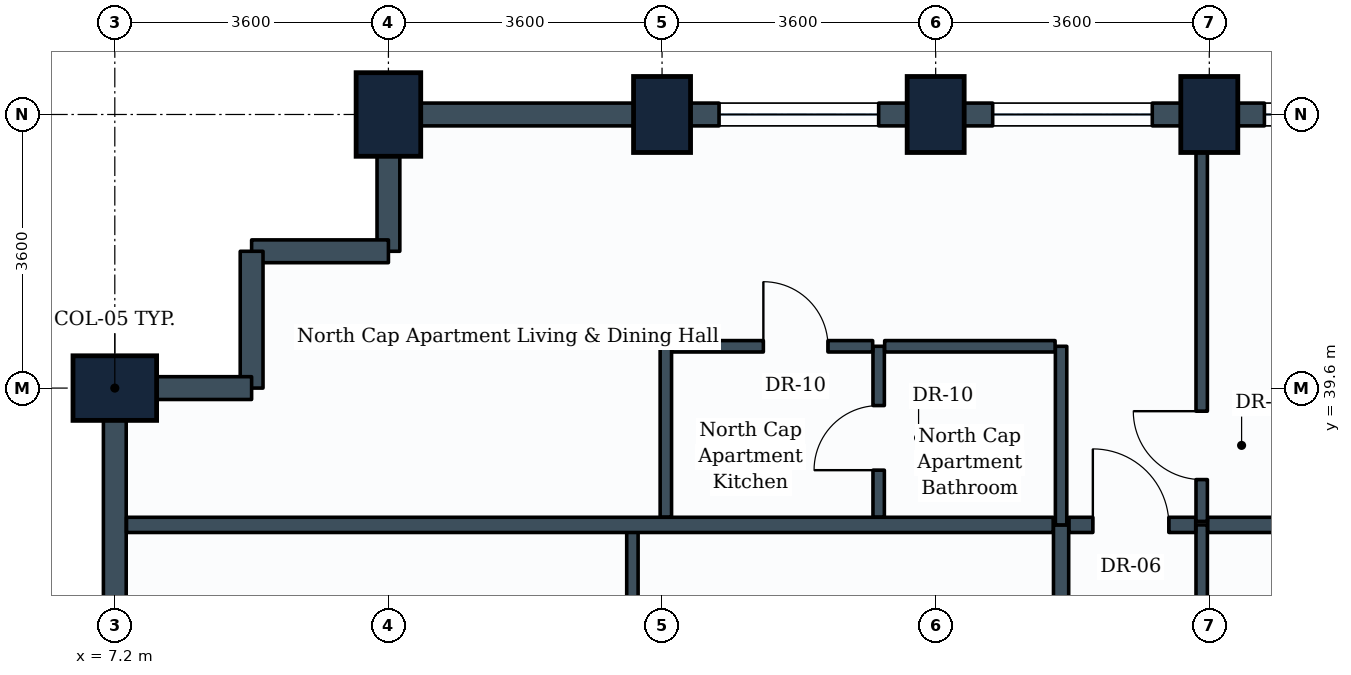
"""IFC4 building model, lengths in metres.
Left out: names, types, materials, properties, quantities, classifications, styles, units other than length and angle.
Written with IfcOpenShell. Run it as: python <this file> out.ifc"""

import sys

from ifc_helpers import new_model, si_unit, direction, frame, frame_2d, origin, origin_2d, place, context, subcontext, project, spatial, rectangle, extrude, element, fill, save


model = new_model("IFC4")
c1 = context("Model", 3, precision=1e-05, world=origin(), true_north=direction((0.0, 1.0)))
c2 = subcontext(c1, "Body", "Model", "MODEL_VIEW")
j1 = project(units=[si_unit("LENGTHUNIT", "METRE"), si_unit("PLANEANGLEUNIT", "RADIAN")], contexts=[c1])
p1 = place(None, origin())
s1 = spatial("IfcSite", under=j1, at=p1, CompositionType="ELEMENT")
p2 = place(p1, origin())
s2 = spatial("IfcBuilding", under=s1, at=p2, CompositionType="ELEMENT")
p3 = place(p2, frame((0.0, 0.0, 146.6)))
s3 = spatial("IfcBuildingStorey", under=s2, at=p3, CompositionType="ELEMENT", Elevation=146.6)
for number, where, z_axis, x_axis in (
    (1, (7.2, 39.6, 0.0), (0.0, 0.0, 1.0), (0.0, 1.0, 0.0)),
    (2, (10.8, 43.2, 0.0), (0.0, 0.0, 1.0), (1.0, 0.0, 0.0)),
):
    element("IfcColumn", number, at=place(p3, frame(where, z_axis=z_axis, x_axis=x_axis)), inside=s3, PredefinedType="COLUMN", context=c2, shape_type="SweptSolid", body=[
        extrude(rectangle(XDim=0.85, YDim=1.1, at=origin_2d()), origin(), (0.0, 0.0, 1.0), 3.8),
    ])
for number, where, z_axis, x_axis in (
    (3, (14.4, 43.2, 0.0), (0.0, 0.0, 1.0), (1.0, 0.0, 0.0)),
    (4, (18.0, 43.2, 0.0), (0.0, 0.0, 1.0), (1.0, 0.0, 0.0)),
    (5, (21.6, 43.2, 0.0), (0.0, 0.0, 1.0), (1.0, 0.0, 0.0)),
):
    element("IfcColumn", number, at=place(p3, frame(where, z_axis=z_axis, x_axis=x_axis)), inside=s3, PredefinedType="COLUMN", context=c2, shape_type="SweptSolid", body=[
        extrude(rectangle(XDim=0.75, YDim=1.0, at=origin_2d()), origin(), (0.0, 0.0, 1.0), 3.8),
    ])
p4 = place(p3, frame((21.6, 43.2, 0.0), z_axis=(0.0, 0.0, 1.0), x_axis=(1.0, 0.0, 0.0)))
e6 = element("IfcWall", 6, at=p4, inside=s3, PredefinedType="STANDARD", context=c2, shape_type="SweptSolid", body=[
    extrude(rectangle(XDim=3.6, YDim=0.3, at=frame_2d((1.8, 0.0))), origin(), (0.0, 0.0, 1.0), 2.93),
])
p5 = place(p4, frame((0.725, 0.0, 0.85)))
e7 = element("IfcOpeningElement", 7, at=p5, cuts=e6, PredefinedType="OPENING", context=c2, shape_type="SweptSolid", body=[
    extrude(rectangle(XDim=2.1, YDim=1.35, at=frame_2d((1.05, 0.675))), frame((0.0, 0.16, 0.0), z_axis=(0.0, -1.0, 0.0), x_axis=(1.0, 0.0, 0.0)), (0.0, 0.0, 1.0), 0.32),
])
p6 = place(p3, frame((18.0, 43.2, 0.0), z_axis=(0.0, 0.0, 1.0), x_axis=(1.0, 0.0, 0.0)))
e8 = element("IfcWall", 8, at=p6, inside=s3, PredefinedType="STANDARD", context=c2, shape_type="SweptSolid", body=[
    extrude(rectangle(XDim=3.6, YDim=0.3, at=frame_2d((1.8, 0.0))), origin(), (0.0, 0.0, 1.0), 2.93),
])
p7 = place(p6, frame((0.75, 0.0, 0.85)))
e9 = element("IfcOpeningElement", 9, at=p7, cuts=e8, PredefinedType="OPENING", context=c2, shape_type="SweptSolid", body=[
    extrude(rectangle(XDim=2.1, YDim=1.35, at=frame_2d((1.05, 0.675))), frame((0.0, 0.16, 0.0), z_axis=(0.0, -1.0, 0.0), x_axis=(1.0, 0.0, 0.0)), (0.0, 0.0, 1.0), 0.32),
])
p8 = place(p3, frame((14.4, 43.2, 0.0), z_axis=(0.0, 0.0, 1.0), x_axis=(1.0, 0.0, 0.0)))
e10 = element("IfcWall", 10, at=p8, inside=s3, PredefinedType="STANDARD", context=c2, shape_type="SweptSolid", body=[
    extrude(rectangle(XDim=3.6, YDim=0.3, at=frame_2d((1.8, 0.0))), origin(), (0.0, 0.0, 1.0), 2.93),
])
p9 = place(p8, frame((0.75, 0.0, 0.85)))
e11 = element("IfcOpeningElement", 11, at=p9, cuts=e10, PredefinedType="OPENING", context=c2, shape_type="SweptSolid", body=[
    extrude(rectangle(XDim=2.1, YDim=1.35, at=frame_2d((1.05, 0.675))), frame((0.0, 0.16, 0.0), z_axis=(0.0, -1.0, 0.0), x_axis=(1.0, 0.0, 0.0)), (0.0, 0.0, 1.0), 0.32),
])
p10 = place(p3, frame((10.8, 43.2, 0.0), z_axis=(0.0, 0.0, 1.0), x_axis=(1.0, 0.0, 0.0)))
e12 = element("IfcWall", 12, at=p10, inside=s3, PredefinedType="STANDARD", context=c2, shape_type="SweptSolid", body=[
    extrude(rectangle(XDim=3.6, YDim=0.3, at=frame_2d((1.8, 0.0))), origin(), (0.0, 0.0, 1.0), 2.93),
])
p11 = place(p3, frame((10.8, 41.4, 0.0), z_axis=(0.0, 0.0, 1.0), x_axis=(0.0, 1.0, 0.0)))
e13 = element("IfcWall", 13, at=p11, inside=s3, PredefinedType="STANDARD", context=c2, shape_type="SweptSolid", body=[
    extrude(rectangle(XDim=1.8, YDim=0.3, at=frame_2d((0.9, 0.0))), origin(), (0.0, 0.0, 1.0), 2.93),
])
p12 = place(p3, frame((9.0, 41.4, 0.0), z_axis=(0.0, 0.0, 1.0), x_axis=(1.0, 0.0, 0.0)))
e14 = element("IfcWall", 14, at=p12, inside=s3, PredefinedType="STANDARD", context=c2, shape_type="SweptSolid", body=[
    extrude(rectangle(XDim=1.8, YDim=0.3, at=frame_2d((0.9, 0.0))), origin(), (0.0, 0.0, 1.0), 3.535),
])
p13 = place(p3, frame((9.0, 39.6, 0.0), z_axis=(0.0, 0.0, 1.0), x_axis=(0.0, 1.0, 0.0)))
e15 = element("IfcWall", 15, at=p13, inside=s3, PredefinedType="STANDARD", context=c2, shape_type="SweptSolid", body=[
    extrude(rectangle(XDim=1.8, YDim=0.3, at=frame_2d((0.9, 0.0))), origin(), (0.0, 0.0, 1.0), 3.535),
])
p14 = place(p3, frame((7.2, 39.6, 0.0), z_axis=(0.0, 0.0, 1.0), x_axis=(1.0, 0.0, 0.0)))
e16 = element("IfcWall", 16, at=p14, inside=s3, PredefinedType="STANDARD", context=c2, shape_type="SweptSolid", body=[
    extrude(rectangle(XDim=1.8, YDim=0.3, at=frame_2d((0.9, 0.0))), origin(), (0.0, 0.0, 1.0), 2.93),
])
p15 = place(p3, frame((7.2, 36.0, 0.0), z_axis=(0.0, 0.0, 1.0), x_axis=(0.0, 1.0, 0.0)))
e17 = element("IfcWall", 17, at=p15, inside=s3, PredefinedType="STANDARD", context=c2, shape_type="SweptSolid", body=[
    extrude(rectangle(XDim=3.6, YDim=0.3, at=frame_2d((1.8, 0.0))), origin(), (0.0, 0.0, 1.0), 2.93),
])
p16 = place(p3, frame((19.65, 33.7, 0.0), z_axis=(0.0, 0.0, 1.0), x_axis=(0.0, 1.0, 0.0)))
e18 = element("IfcWall", 18, at=p16, inside=s3, PredefinedType="PARTITIONING", context=c2, shape_type="SweptSolid", body=[
    extrude(rectangle(XDim=4.1, YDim=0.2, at=frame_2d((2.05, 0.0))), origin(), (0.0, 0.0, 1.0), 3.17),
])
p17 = place(p16, frame((1.55, 0.0, 0.0)))
e19 = element("IfcOpeningElement", 19, at=p17, cuts=e18, PredefinedType="OPENING", context=c2, shape_type="SweptSolid", body=[
    extrude(rectangle(XDim=1.0, YDim=2.1, at=frame_2d((0.5, 1.05))), frame((0.0, 0.11, 0.0), z_axis=(0.0, -1.0, 0.0), x_axis=(1.0, 0.0, 0.0)), (0.0, 0.0, 1.0), 0.22),
])
p18 = place(p3, frame((14.01, 33.9, 0.0), z_axis=(0.0, 0.0, 1.0), x_axis=(0.0, 1.0, 0.0)))
e20 = element("IfcWall", 20, at=p18, inside=s3, PredefinedType="PARTITIONING", context=c2, shape_type="SweptSolid", body=[
    extrude(rectangle(XDim=3.9, YDim=0.15, at=frame_2d((1.95, 0.0))), origin(), (0.0, 0.0, 1.0), 3.17),
])
p19 = place(p18, frame((1.461, 0.0, 0.0)))
e21 = element("IfcOpeningElement", 21, at=p19, cuts=e20, PredefinedType="OPENING", context=c2, shape_type="SweptSolid", body=[
    extrude(rectangle(XDim=0.9, YDim=2.1, at=frame_2d((0.45, 1.05))), frame((0.0, 0.085, 0.0), z_axis=(0.0, -1.0, 0.0), x_axis=(1.0, 0.0, 0.0)), (0.0, 0.0, 1.0), 0.17),
])
p20 = place(p3, frame((21.5, 32.379, 0.0), z_axis=(0.0, 0.0, 1.0), x_axis=(0.0, 1.0, 0.0)))
e22 = element("IfcWall", 22, at=p20, inside=s3, PredefinedType="PARTITIONING", context=c2, shape_type="SweptSolid", body=[
    extrude(rectangle(XDim=5.421, YDim=0.15, at=frame_2d((2.71, 0.0))), origin(), (0.0, 0.0, 1.0), 3.17),
])
p21 = place(p20, frame((2.171, 0.0, 0.0)))
e23 = element("IfcOpeningElement", 23, at=p21, cuts=e22, PredefinedType="OPENING", context=c2, shape_type="SweptSolid", body=[
    extrude(rectangle(XDim=1.0, YDim=2.1, at=frame_2d((0.5, 1.05))), frame((0.0, 0.085, 0.0), z_axis=(0.0, -1.0, 0.0), x_axis=(1.0, 0.0, 0.0)), (0.0, 0.0, 1.0), 0.17),
])
p22 = place(p3, frame((7.354, 37.8, 0.0), z_axis=(0.0, 0.0, 1.0), x_axis=(1.0, 0.0, 0.0)))
e24 = element("IfcWall", 24, at=p22, inside=s3, PredefinedType="PARTITIONING", context=c2, shape_type="SweptSolid", body=[
    extrude(rectangle(XDim=12.192, YDim=0.2, at=frame_2d((6.096, 0.0))), origin(), (0.0, 0.0, 1.0), 2.93),
])
p23 = place(p3, frame((21.579, 37.8, 0.0), z_axis=(0.0, 0.0, 1.0), x_axis=(1.0, 0.0, 0.0)))
e25 = element("IfcWall", 25, at=p23, inside=s3, PredefinedType="PARTITIONING", context=c2, shape_type="SweptSolid", body=[
    extrude(rectangle(XDim=5.121, YDim=0.2, at=frame_2d((2.561, 0.0))), origin(), (0.0, 0.0, 1.0), 3.535),
])
p24 = place(p3, frame((19.754, 37.8, 0.0), z_axis=(0.0, 0.0, 1.0), x_axis=(1.0, 0.0, 0.0)))
e26 = element("IfcWall", 26, at=p24, inside=s3, PredefinedType="PARTITIONING", context=c2, shape_type="SweptSolid", body=[
    extrude(rectangle(XDim=1.667, YDim=0.2, at=frame_2d((0.833, 0.0))), origin(), (0.0, 0.0, 1.0), 3.535),
])
p25 = place(p24, frame((0.314, 0.0, 0.0)))
e27 = element("IfcOpeningElement", 27, at=p25, cuts=e26, PredefinedType="OPENING", context=c2, shape_type="SweptSolid", body=[
    extrude(rectangle(XDim=1.0, YDim=2.1, at=frame_2d((0.5, 1.05))), frame((0.0, 0.11, 0.0), z_axis=(0.0, -1.0, 0.0), x_axis=(1.0, 0.0, 0.0)), (0.0, 0.0, 1.0), 0.22),
])
p26 = place(p3, frame((19.65, 37.8, 0.0), z_axis=(0.0, 0.0, 1.0), x_axis=(0.0, 1.0, 0.0)))
e28 = element("IfcWall", 28, at=p26, inside=s3, PredefinedType="PARTITIONING", context=c2, shape_type="SweptSolid", body=[
    extrude(rectangle(XDim=2.35, YDim=0.15, at=frame_2d((1.175, 0.0))), origin(), (0.0, 0.0, 1.0), 3.535),
])
p27 = place(p3, frame((17.25, 37.904, 0.0), z_axis=(0.0, 0.0, 1.0), x_axis=(0.0, 1.0, 0.0)))
e29 = element("IfcWall", 29, at=p27, inside=s3, PredefinedType="PARTITIONING", context=c2, shape_type="SweptSolid", body=[
    extrude(rectangle(XDim=2.246, YDim=0.15, at=frame_2d((1.123, 0.0))), origin(), (0.0, 0.0, 1.0), 3.535),
])
p28 = place(p27, frame((0.616, 0.0, 0.0)))
e30 = element("IfcOpeningElement", 30, at=p28, cuts=e29, PredefinedType="OPENING", context=c2, shape_type="SweptSolid", body=[
    extrude(rectangle(XDim=0.85, YDim=2.1, at=frame_2d((0.425, 1.05))), frame((0.0, 0.085, 0.0), z_axis=(0.0, -1.0, 0.0), x_axis=(1.0, 0.0, 0.0)), (0.0, 0.0, 1.0), 0.17),
])
p29 = place(p3, frame((17.329, 40.15, 0.0), z_axis=(0.0, 0.0, 1.0), x_axis=(1.0, 0.0, 0.0)))
e31 = element("IfcWall", 31, at=p29, inside=s3, PredefinedType="PARTITIONING", context=c2, shape_type="SweptSolid", body=[
    extrude(rectangle(XDim=2.242, YDim=0.15, at=frame_2d((1.121, 0.0))), origin(), (0.0, 0.0, 1.0), 3.17),
])
p30 = place(p3, frame((21.5, 37.846, 0.0), z_axis=(0.0, 0.0, 1.0), x_axis=(0.0, 1.0, 0.0)))
e32 = element("IfcWall", 32, at=p30, inside=s3, PredefinedType="PARTITIONING", context=c2, shape_type="SweptSolid", body=[
    extrude(rectangle(XDim=5.2, YDim=0.15, at=frame_2d((2.6, 0.0))), origin(), (0.0, 0.0, 1.0), 2.93),
])
p31 = place(p30, frame((0.55, 0.0, 0.0)))
e33 = element("IfcOpeningElement", 33, at=p31, cuts=e32, PredefinedType="OPENING", context=c2, shape_type="SweptSolid", body=[
    extrude(rectangle(XDim=0.9, YDim=2.1, at=frame_2d((0.45, 1.05))), frame((0.0, 0.085, 0.0), z_axis=(0.0, -1.0, 0.0), x_axis=(1.0, 0.0, 0.0)), (0.0, 0.0, 1.0), 0.17),
])
p32 = place(p3, frame((14.45, 37.904, 0.0), z_axis=(0.0, 0.0, 1.0), x_axis=(0.0, 1.0, 0.0)))
e34 = element("IfcWall", 34, at=p32, inside=s3, PredefinedType="PARTITIONING", context=c2, shape_type="SweptSolid", body=[
    extrude(rectangle(XDim=2.246, YDim=0.15, at=frame_2d((1.123, 0.0))), origin(), (0.0, 0.0, 1.0), 3.535),
])
p33 = place(p3, frame((14.529, 40.15, 0.0), z_axis=(0.0, 0.0, 1.0), x_axis=(1.0, 0.0, 0.0)))
e35 = element("IfcWall", 35, at=p33, inside=s3, PredefinedType="PARTITIONING", context=c2, shape_type="SweptSolid", body=[
    extrude(rectangle(XDim=2.642, YDim=0.15, at=frame_2d((1.321, 0.0))), origin(), (0.0, 0.0, 1.0), 3.535),
])
p34 = place(p33, frame((1.204, 0.0, 0.0)))
e36 = element("IfcOpeningElement", 36, at=p34, cuts=e35, PredefinedType="OPENING", context=c2, shape_type="SweptSolid", body=[
    extrude(rectangle(XDim=0.85, YDim=2.1, at=frame_2d((0.425, 1.05))), frame((0.0, 0.085, 0.0), z_axis=(0.0, -1.0, 0.0), x_axis=(1.0, 0.0, 0.0)), (0.0, 0.0, 1.0), 0.17),
])
p35 = place(p5, origin())
e37 = element("IfcWindow", 37, at=p35, inside=s3, PartitioningType="SINGLE_PANEL", PredefinedType="WINDOW", context=c2, shape_type="SweptSolid", body=[
    extrude(rectangle(XDim=2.1, YDim=1.35, at=frame_2d((1.05, 0.675))), frame((0.0, 0.03, 0.0), z_axis=(0.0, -1.0, 0.0), x_axis=(1.0, 0.0, 0.0)), (0.0, 0.0, 1.0), 0.06),
])
fill(e7, e37)
p36 = place(p7, origin())
e38 = element("IfcWindow", 38, at=p36, inside=s3, PartitioningType="SINGLE_PANEL", PredefinedType="WINDOW", context=c2, shape_type="SweptSolid", body=[
    extrude(rectangle(XDim=2.1, YDim=1.35, at=frame_2d((1.05, 0.675))), frame((0.0, 0.03, 0.0), z_axis=(0.0, -1.0, 0.0), x_axis=(1.0, 0.0, 0.0)), (0.0, 0.0, 1.0), 0.06),
])
fill(e9, e38)
p37 = place(p9, origin())
e39 = element("IfcWindow", 39, at=p37, inside=s3, PartitioningType="SINGLE_PANEL", PredefinedType="WINDOW", context=c2, shape_type="SweptSolid", body=[
    extrude(rectangle(XDim=2.1, YDim=1.35, at=frame_2d((1.05, 0.675))), frame((0.0, 0.03, 0.0), z_axis=(0.0, -1.0, 0.0), x_axis=(1.0, 0.0, 0.0)), (0.0, 0.0, 1.0), 0.06),
])
fill(e11, e39)
p38 = place(p25, origin())
e40 = element("IfcDoor", 40, at=p38, inside=s3, OperationType="SINGLE_SWING_LEFT", PredefinedType="DOOR", context=c2, shape_type="SweptSolid", body=[
    extrude(rectangle(XDim=1.0, YDim=2.1, at=frame_2d((0.5, 1.05))), frame((0.0, 0.025, 0.0), z_axis=(0.0, -1.0, 0.0), x_axis=(1.0, 0.0, 0.0)), (0.0, 0.0, 1.0), 0.05),
])
fill(e27, e40)
p39 = place(p28, origin())
e41 = element("IfcDoor", 41, at=p39, inside=s3, OperationType="SINGLE_SWING_LEFT", PredefinedType="DOOR", context=c2, shape_type="SweptSolid", body=[
    extrude(rectangle(XDim=0.85, YDim=2.1, at=frame_2d((0.425, 1.05))), frame((0.0, 0.025, 0.0), z_axis=(0.0, -1.0, 0.0), x_axis=(1.0, 0.0, 0.0)), (0.0, 0.0, 1.0), 0.05),
])
fill(e30, e41)
p40 = place(p31, origin())
e42 = element("IfcDoor", 42, at=p40, inside=s3, OperationType="SINGLE_SWING_RIGHT", PredefinedType="DOOR", context=c2, shape_type="SweptSolid", body=[
    extrude(rectangle(XDim=0.9, YDim=2.1, at=frame_2d((0.45, 1.05))), frame((0.0, 0.025, 0.0), z_axis=(0.0, -1.0, 0.0), x_axis=(1.0, 0.0, 0.0)), (0.0, 0.0, 1.0), 0.05),
])
fill(e33, e42)
p41 = place(p34, origin())
e43 = element("IfcDoor", 43, at=p41, inside=s3, OperationType="SINGLE_SWING_LEFT", PredefinedType="DOOR", context=c2, shape_type="SweptSolid", body=[
    extrude(rectangle(XDim=0.85, YDim=2.1, at=frame_2d((0.425, 1.05))), frame((0.0, 0.025, 0.0), z_axis=(0.0, -1.0, 0.0), x_axis=(1.0, 0.0, 0.0)), (0.0, 0.0, 1.0), 0.05),
])
fill(e36, e43)
save(model, sys.argv[1])
